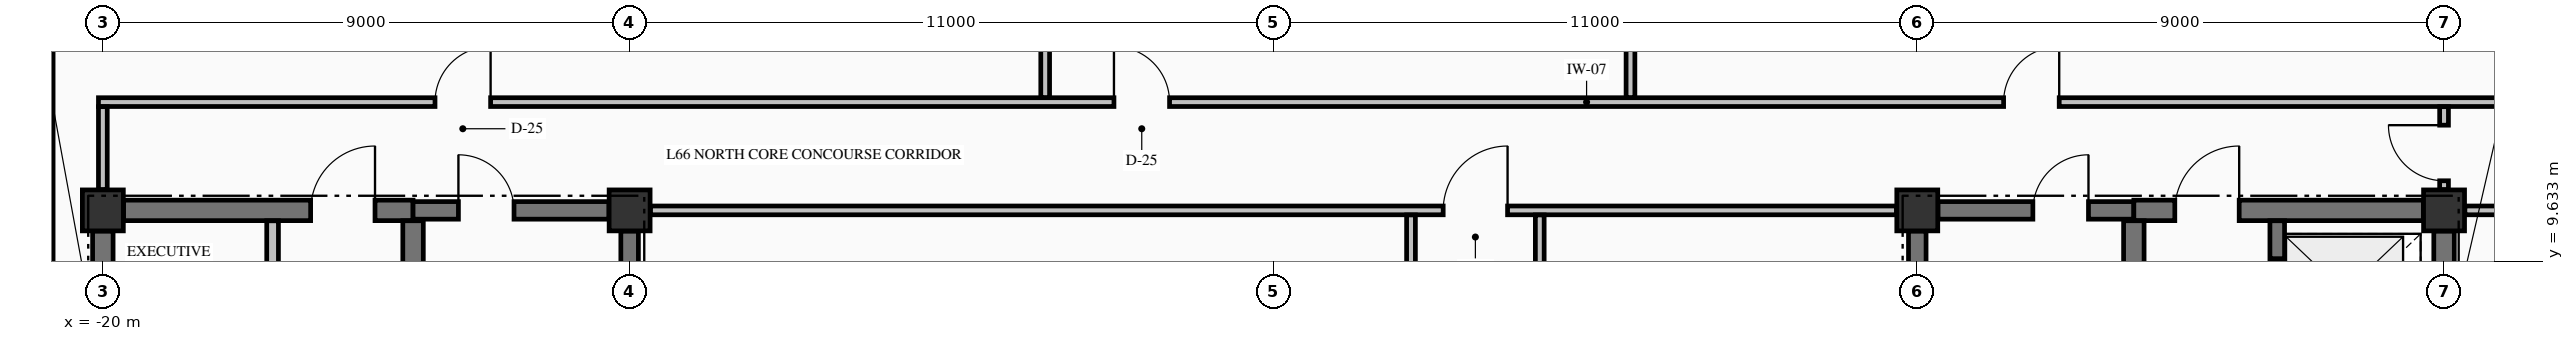
"""IFC4 building model, lengths in metres.
Left out: names, types, materials, properties, quantities, classifications, styles, units other than length and angle.
Written with IfcOpenShell. Run it as: python <this file> out.ifc"""

import sys

from ifc_helpers import new_model, si_unit, direction, frame, frame_2d, origin, origin_2d, place, context, subcontext, project, spatial, rectangle, extrude, element, fill, save


model = new_model("IFC4")
c1 = context("Model", 3, precision=1e-05, world=origin(), true_north=direction((0.0, 1.0)))
c2 = subcontext(c1, "Body", "Model", "MODEL_VIEW")
j1 = project(units=[si_unit("LENGTHUNIT", "METRE"), si_unit("PLANEANGLEUNIT", "RADIAN")], contexts=[c1])
p1 = place(None, origin())
s1 = spatial("IfcSite", under=j1, at=p1, CompositionType="ELEMENT")
p2 = place(p1, origin())
s2 = spatial("IfcBuilding", under=s1, at=p2, CompositionType="ELEMENT")
p3 = place(p2, frame((0.0, 0.0, 249.43)))
s3 = spatial("IfcBuildingStorey", under=s2, at=p3, CompositionType="ELEMENT", Elevation=249.43)
for number, where, z_axis, x_axis in (
    (1, (-20.0, 10.5, -0.425), (0.0, 0.0, 1.0), (1.0, 0.0, 0.0)),
    (2, (-11.0, 10.5, -0.425), (0.0, 0.0, 1.0), (1.0, 0.0, 0.0)),
    (3, (11.0, 10.5, -0.425), (0.0, 0.0, 1.0), (1.0, 0.0, 0.0)),
    (4, (20.0, 10.5, -0.425), (0.0, 0.0, 1.0), (1.0, 0.0, 0.0)),
):
    element("IfcColumn", number, at=place(p3, frame(where, z_axis=z_axis, x_axis=x_axis)), inside=s3, PredefinedType="COLUMN", context=c2, shape_type="SweptSolid", body=[
        extrude(rectangle(XDim=0.7, YDim=0.7, at=origin_2d()), origin(), (0.0, 0.0, 1.0), 5.0),
    ])
p4 = place(p3, frame((-21.0, 17.545, 0.0), z_axis=(0.0, 0.0, 1.0), x_axis=(0.0, -1.0, 0.0)))
e5 = element("IfcWall", 5, at=p4, inside=s3, PredefinedType="STANDARD", context=c2, shape_type="SweptSolid", body=[
    extrude(rectangle(XDim=8.09, YDim=0.3, at=frame_2d((4.045, 0.0))), origin(), (0.0, 0.0, 1.0), 2.167),
])
p5 = place(p3, frame((-19.646, 10.5, 0.0), z_axis=(0.0, 0.0, 1.0), x_axis=(1.0, 0.0, 0.0)))
e6 = element("IfcWall", 6, at=p5, inside=s3, PredefinedType="SHEAR", context=c2, shape_type="SweptSolid", body=[
    extrude(rectangle(XDim=4.946, YDim=0.35, at=frame_2d((2.473, 0.0))), origin(), (0.0, 0.0, 1.0), 4.575),
])
p6 = place(p5, frame((3.196, 0.0, 0.0)))
e7 = element("IfcOpeningElement", 7, at=p6, cuts=e6, PredefinedType="OPENING", context=c2, shape_type="SweptSolid", body=[
    extrude(rectangle(XDim=1.1, YDim=2.15, at=frame_2d((0.55, 1.075))), frame((0.0, 0.185, 0.0), z_axis=(0.0, -1.0, 0.0), x_axis=(1.0, 0.0, 0.0)), (0.0, 0.0, 1.0), 0.37),
])
p7 = place(p3, frame((-14.7, 10.5, 0.0), z_axis=(0.0, 0.0, 1.0), x_axis=(1.0, 0.0, 0.0)))
e8 = element("IfcWall", 8, at=p7, inside=s3, PredefinedType="SHEAR", context=c2, shape_type="SweptSolid", body=[
    extrude(rectangle(XDim=3.346, YDim=0.3, at=frame_2d((1.673, 0.0))), origin(), (0.0, 0.0, 1.0), 4.575),
])
p8 = place(p7, frame((0.775, 0.0, 0.0)))
e9 = element("IfcOpeningElement", 9, at=p8, cuts=e8, PredefinedType="OPENING", context=c2, shape_type="SweptSolid", body=[
    extrude(rectangle(XDim=0.95, YDim=2.15, at=frame_2d((0.475, 1.075))), frame((0.0, 0.16, 0.0), z_axis=(0.0, -1.0, 0.0), x_axis=(1.0, 0.0, 0.0)), (0.0, 0.0, 1.0), 0.32),
])
p9 = place(p3, frame((11.354, 10.5, 0.0), z_axis=(0.0, 0.0, 1.0), x_axis=(1.0, 0.0, 0.0)))
e10 = element("IfcWall", 10, at=p9, inside=s3, PredefinedType="SHEAR", context=c2, shape_type="SweptSolid", body=[
    extrude(rectangle(XDim=3.346, YDim=0.3, at=frame_2d((1.673, 0.0))), origin(), (0.0, 0.0, 1.0), 4.575),
])
p10 = place(p9, frame((1.621, 0.0, 0.0)))
e11 = element("IfcOpeningElement", 11, at=p10, cuts=e10, PredefinedType="OPENING", context=c2, shape_type="SweptSolid", body=[
    extrude(rectangle(XDim=0.95, YDim=2.15, at=frame_2d((0.475, 1.075))), frame((0.0, 0.16, 0.0), z_axis=(0.0, -1.0, 0.0), x_axis=(1.0, 0.0, 0.0)), (0.0, 0.0, 1.0), 0.32),
])
p11 = place(p3, frame((14.7, 10.5, 0.0), z_axis=(0.0, 0.0, 1.0), x_axis=(1.0, 0.0, 0.0)))
e12 = element("IfcWall", 12, at=p11, inside=s3, PredefinedType="SHEAR", context=c2, shape_type="SweptSolid", body=[
    extrude(rectangle(XDim=4.946, YDim=0.35, at=frame_2d((2.473, 0.0))), origin(), (0.0, 0.0, 1.0), 4.575),
])
p12 = place(p11, frame((0.7, 0.0, 0.0)))
e13 = element("IfcOpeningElement", 13, at=p12, cuts=e12, PredefinedType="OPENING", context=c2, shape_type="SweptSolid", body=[
    extrude(rectangle(XDim=1.1, YDim=2.15, at=frame_2d((0.55, 1.075))), frame((0.0, 0.185, 0.0), z_axis=(0.0, -1.0, 0.0), x_axis=(1.0, 0.0, 0.0)), (0.0, 0.0, 1.0), 0.37),
])
p13 = place(p3, frame((-10.644, 10.5, 0.0), z_axis=(0.0, 0.0, 1.0), x_axis=(1.0, 0.0, 0.0)))
e14 = element("IfcWall", 14, at=p13, inside=s3, PredefinedType="PARTITIONING", context=c2, shape_type="SweptSolid", body=[
    extrude(rectangle(XDim=21.288, YDim=0.15, at=frame_2d((10.644, 0.0))), origin(), (0.0, 0.0, 1.0), 4.575),
])
p14 = place(p13, frame((13.544, 0.0, 0.0)))
e15 = element("IfcOpeningElement", 15, at=p14, cuts=e14, PredefinedType="OPENING", context=c2, shape_type="SweptSolid", body=[
    extrude(rectangle(XDim=1.1, YDim=2.15, at=frame_2d((0.55, 1.075))), frame((0.0, 0.085, 0.0), z_axis=(0.0, -1.0, 0.0), x_axis=(1.0, 0.0, 0.0)), (0.0, 0.0, 1.0), 0.17),
])
p15 = place(p3, frame((20.356, 10.5, 0.0), z_axis=(0.0, 0.0, 1.0), x_axis=(1.0, 0.0, 0.0)))
e16 = element("IfcWall", 16, at=p15, inside=s3, PredefinedType="PARTITIONING", context=c2, shape_type="SweptSolid", body=[
    extrude(rectangle(XDim=5.479, YDim=0.15, at=frame_2d((2.74, 0.0))), origin(), (0.0, 0.0, 1.0), 4.575),
])
p16 = place(p15, frame((2.144, 0.0, 0.0)))
e17 = element("IfcOpeningElement", 17, at=p16, cuts=e16, PredefinedType="OPENING", context=c2, shape_type="SweptSolid", body=[
    extrude(rectangle(XDim=1.0, YDim=2.15, at=frame_2d((0.5, 1.075))), frame((0.0, 0.085, 0.0), z_axis=(0.0, -1.0, 0.0), x_axis=(1.0, 0.0, 0.0)), (0.0, 0.0, 1.0), 0.17),
])
p17 = place(p3, frame((-20.075, 12.35, 0.0), z_axis=(0.0, 0.0, 1.0), x_axis=(1.0, 0.0, 0.0)))
e18 = element("IfcWall", 18, at=p17, inside=s3, PredefinedType="PARTITIONING", context=c2, shape_type="SweptSolid", body=[
    extrude(rectangle(XDim=45.91, YDim=0.15, at=frame_2d((22.955, 0.0))), origin(), (0.0, 0.0, 1.0), 2.167),
])
p18 = place(p17, frame((5.75, 0.0, 0.0)))
e19 = element("IfcOpeningElement", 19, at=p18, cuts=e18, PredefinedType="OPENING", context=c2, shape_type="SweptSolid", body=[
    extrude(rectangle(XDim=0.95, YDim=2.02, at=frame_2d((0.475, 1.01))), frame((0.0, 0.085, 0.0), z_axis=(0.0, -1.0, 0.0), x_axis=(1.0, 0.0, 0.0)), (0.0, 0.0, 1.0), 0.17),
])
p19 = place(p17, frame((17.35, 0.0, 0.0)))
e20 = element("IfcOpeningElement", 20, at=p19, cuts=e18, PredefinedType="OPENING", context=c2, shape_type="SweptSolid", body=[
    extrude(rectangle(XDim=0.95, YDim=2.02, at=frame_2d((0.475, 1.01))), frame((0.0, 0.085, 0.0), z_axis=(0.0, -1.0, 0.0), x_axis=(1.0, 0.0, 0.0)), (0.0, 0.0, 1.0), 0.17),
])
p20 = place(p17, frame((32.55, 0.0, 0.0)))
e21 = element("IfcOpeningElement", 21, at=p20, cuts=e18, PredefinedType="OPENING", context=c2, shape_type="SweptSolid", body=[
    extrude(rectangle(XDim=0.95, YDim=2.02, at=frame_2d((0.475, 1.01))), frame((0.0, 0.085, 0.0), z_axis=(0.0, -1.0, 0.0), x_axis=(1.0, 0.0, 0.0)), (0.0, 0.0, 1.0), 0.17),
])
p21 = place(p3, frame((-20.0, 5.327, 0.0), z_axis=(0.0, 0.0, 1.0), x_axis=(0.0, 1.0, 0.0)))
e22 = element("IfcWall", 22, at=p21, inside=s3, PredefinedType="SHEAR", context=c2, shape_type="SweptSolid", body=[
    extrude(rectangle(XDim=4.819, YDim=0.35, at=frame_2d((2.41, 0.0))), origin(), (0.0, 0.0, 1.0), 4.575),
])
p22 = place(p3, frame((-14.7, 5.852, 0.0), z_axis=(0.0, 0.0, 1.0), x_axis=(0.0, 1.0, 0.0)))
e23 = element("IfcWall", 23, at=p22, inside=s3, PredefinedType="SHEAR", context=c2, shape_type="SweptSolid", body=[
    extrude(rectangle(XDim=4.471, YDim=0.35, at=frame_2d((2.235, 0.0))), origin(), (0.0, 0.0, 1.0), 4.575),
])
for number, where, z_axis, x_axis in (
    (24, (-11.0, 5.852, 0.0), (0.0, 0.0, 1.0), (0.0, 1.0, 0.0)),
    (25, (11.0, 5.852, 0.0), (0.0, 0.0, 1.0), (0.0, 1.0, 0.0)),
):
    element("IfcWall", number, at=place(p3, frame(where, z_axis=z_axis, x_axis=x_axis)), inside=s3, PredefinedType="SHEAR", context=c2, shape_type="SweptSolid", body=[
        extrude(rectangle(XDim=4.294, YDim=0.3, at=frame_2d((2.147, 0.0))), origin(), (0.0, 0.0, 1.0), 4.575),
    ])
p23 = place(p3, frame((14.7, 5.852, 0.0), z_axis=(0.0, 0.0, 1.0), x_axis=(0.0, 1.0, 0.0)))
e26 = element("IfcWall", 26, at=p23, inside=s3, PredefinedType="SHEAR", context=c2, shape_type="SweptSolid", body=[
    extrude(rectangle(XDim=4.471, YDim=0.35, at=frame_2d((2.235, 0.0))), origin(), (0.0, 0.0, 1.0), 4.575),
])
p24 = place(p3, frame((17.15, 7.877, 0.0), z_axis=(0.0, 0.0, 1.0), x_axis=(0.0, 1.0, 0.0)))
e27 = element("IfcWall", 27, at=p24, inside=s3, PredefinedType="SOLIDWALL", context=c2, shape_type="SweptSolid", body=[
    extrude(rectangle(XDim=2.446, YDim=0.25, at=frame_2d((1.223, 0.0))), origin(), (0.0, 0.0, 1.0), 4.575),
])
p25 = place(p24, frame((0.698, 0.0, 0.0)))
e28 = element("IfcOpeningElement", 28, at=p25, cuts=e27, PredefinedType="OPENING", context=c2, shape_type="SweptSolid", body=[
    extrude(rectangle(XDim=1.1, YDim=2.2, at=frame_2d((0.55, 1.1))), frame((0.0, 0.135, 0.0), z_axis=(0.0, -1.0, 0.0), x_axis=(1.0, 0.0, 0.0)), (0.0, 0.0, 1.0), 0.27),
])
p26 = place(p3, frame((20.0, 7.877, 0.0), z_axis=(0.0, 0.0, 1.0), x_axis=(0.0, 1.0, 0.0)))
e29 = element("IfcWall", 29, at=p26, inside=s3, PredefinedType="SHEAR", context=c2, shape_type="SweptSolid", body=[
    extrude(rectangle(XDim=2.269, YDim=0.35, at=frame_2d((1.135, 0.0))), origin(), (0.0, 0.0, 1.0), 4.575),
])
p27 = place(p3, frame((-20.0, 10.856, 0.0), z_axis=(0.0, 0.0, 1.0), x_axis=(0.0, 1.0, 0.0)))
e30 = element("IfcWall", 30, at=p27, inside=s3, PredefinedType="PARTITIONING", context=c2, shape_type="SweptSolid", body=[
    extrude(rectangle(XDim=1.416, YDim=0.15, at=frame_2d((0.708, 0.0))), origin(), (0.0, 0.0, 1.0), 4.165),
])
p28 = place(p3, frame((-17.1, 5.328, 0.0), z_axis=(0.0, 0.0, 1.0), x_axis=(0.0, 1.0, 0.0)))
e31 = element("IfcWall", 31, at=p28, inside=s3, PredefinedType="PARTITIONING", context=c2, shape_type="SweptSolid", body=[
    extrude(rectangle(XDim=4.994, YDim=0.2, at=frame_2d((2.497, 0.0))), origin(), (0.0, 0.0, 1.0), 4.575),
])
p29 = place(p28, frame((2.072, 0.0, 0.0)))
e32 = element("IfcOpeningElement", 32, at=p29, cuts=e31, PredefinedType="OPENING", context=c2, shape_type="SweptSolid", body=[
    extrude(rectangle(XDim=0.9, YDim=2.15, at=frame_2d((0.45, 1.075))), frame((0.0, 0.11, 0.0), z_axis=(0.0, -1.0, 0.0), x_axis=(1.0, 0.0, 0.0)), (0.0, 0.0, 1.0), 0.22),
])
p30 = place(p3, frame((-3.9, 12.428, 0.0), z_axis=(0.0, 0.0, 1.0), x_axis=(0.0, 1.0, 0.0)))
e33 = element("IfcWall", 33, at=p30, inside=s3, PredefinedType="PARTITIONING", context=c2, shape_type="SweptSolid", body=[
    extrude(rectangle(XDim=10.907, YDim=0.15, at=frame_2d((5.454, 0.0))), origin(), (0.0, 0.0, 1.0), 4.575),
])
for number, where, z_axis, x_axis in (
    (34, (2.35, 2.978, 0.0), (0.0, 0.0, 1.0), (0.0, 1.0, 0.0)),
    (35, (4.55, 2.978, 0.0), (0.0, 0.0, 1.0), (0.0, 1.0, 0.0)),
):
    element("IfcWall", number, at=place(p3, frame(where, z_axis=z_axis, x_axis=x_axis)), inside=s3, PredefinedType="PARTITIONING", context=c2, shape_type="SweptSolid", body=[
        extrude(rectangle(XDim=7.444, YDim=0.15, at=frame_2d((3.722, 0.0))), origin(), (0.0, 0.0, 1.0), 4.575),
    ])
p31 = place(p3, frame((6.1, 12.428, 0.0), z_axis=(0.0, 0.0, 1.0), x_axis=(0.0, 1.0, 0.0)))
e36 = element("IfcWall", 36, at=p31, inside=s3, PredefinedType="PARTITIONING", context=c2, shape_type="SweptSolid", body=[
    extrude(rectangle(XDim=10.907, YDim=0.15, at=frame_2d((5.454, 0.0))), origin(), (0.0, 0.0, 1.0), 4.575),
])
p32 = place(p3, frame((20.0, 10.856, 0.0), z_axis=(0.0, 0.0, 1.0), x_axis=(0.0, 1.0, 0.0)))
e37 = element("IfcWall", 37, at=p32, inside=s3, PredefinedType="PARTITIONING", context=c2, shape_type="SweptSolid", body=[
    extrude(rectangle(XDim=1.416, YDim=0.15, at=frame_2d((0.708, 0.0))), origin(), (0.0, 0.0, 1.0), 4.575),
])
p33 = place(p32, frame((0.15, 0.0, 0.0)))
e38 = element("IfcOpeningElement", 38, at=p33, cuts=e37, PredefinedType="OPENING", context=c2, shape_type="SweptSolid", body=[
    extrude(rectangle(XDim=0.95, YDim=2.02, at=frame_2d((0.475, 1.01))), frame((0.0, 0.085, 0.0), z_axis=(0.0, -1.0, 0.0), x_axis=(1.0, 0.0, 0.0)), (0.0, 0.0, 1.0), 0.17),
])
p34 = place(p8, origin())
e39 = element("IfcDoor", 39, at=p34, inside=s3, OperationType="SINGLE_SWING_LEFT", PredefinedType="DOOR", context=c2, shape_type="SweptSolid", body=[
    extrude(rectangle(XDim=0.95, YDim=2.15, at=frame_2d((0.475, 1.075))), frame((0.0, 0.025, 0.0), z_axis=(0.0, -1.0, 0.0), x_axis=(1.0, 0.0, 0.0)), (0.0, 0.0, 1.0), 0.05),
])
fill(e9, e39)
p35 = place(p10, origin())
e40 = element("IfcDoor", 40, at=p35, inside=s3, OperationType="SINGLE_SWING_RIGHT", PredefinedType="DOOR", context=c2, shape_type="SweptSolid", body=[
    extrude(rectangle(XDim=0.95, YDim=2.15, at=frame_2d((0.475, 1.075))), frame((0.0, 0.025, 0.0), z_axis=(0.0, -1.0, 0.0), x_axis=(1.0, 0.0, 0.0)), (0.0, 0.0, 1.0), 0.05),
])
fill(e11, e40)
p36 = place(p6, origin())
e41 = element("IfcDoor", 41, at=p36, inside=s3, OperationType="SINGLE_SWING_RIGHT", PredefinedType="DOOR", context=c2, shape_type="SweptSolid", body=[
    extrude(rectangle(XDim=1.1, YDim=2.15, at=frame_2d((0.55, 1.075))), frame((0.0, 0.025, 0.0), z_axis=(0.0, -1.0, 0.0), x_axis=(1.0, 0.0, 0.0)), (0.0, 0.0, 1.0), 0.05),
])
fill(e7, e41)
p37 = place(p25, origin())
e42 = element("IfcDoor", 42, at=p37, inside=s3, OperationType="SLIDING_TO_RIGHT", PredefinedType="DOOR", context=c2, shape_type="SweptSolid", body=[
    extrude(rectangle(XDim=1.1, YDim=2.2, at=frame_2d((0.55, 1.1))), frame((0.0, 0.025, 0.0), z_axis=(0.0, -1.0, 0.0), x_axis=(1.0, 0.0, 0.0)), (0.0, 0.0, 1.0), 0.05),
])
fill(e28, e42)
p38 = place(p12, origin())
e43 = element("IfcDoor", 43, at=p38, inside=s3, OperationType="SINGLE_SWING_RIGHT", PredefinedType="DOOR", context=c2, shape_type="SweptSolid", body=[
    extrude(rectangle(XDim=1.1, YDim=2.15, at=frame_2d((0.55, 1.075))), frame((0.0, 0.025, 0.0), z_axis=(0.0, -1.0, 0.0), x_axis=(1.0, 0.0, 0.0)), (0.0, 0.0, 1.0), 0.05),
])
fill(e13, e43)
p39 = place(p14, origin())
e44 = element("IfcDoor", 44, at=p39, inside=s3, OperationType="SINGLE_SWING_RIGHT", PredefinedType="DOOR", context=c2, shape_type="SweptSolid", body=[
    extrude(rectangle(XDim=1.1, YDim=2.15, at=frame_2d((0.55, 1.075))), frame((0.0, 0.025, 0.0), z_axis=(0.0, -1.0, 0.0), x_axis=(1.0, 0.0, 0.0)), (0.0, 0.0, 1.0), 0.05),
])
fill(e15, e44)
p40 = place(p18, origin())
e45 = element("IfcDoor", 45, at=p40, inside=s3, OperationType="SINGLE_SWING_RIGHT", PredefinedType="DOOR", context=c2, shape_type="SweptSolid", body=[
    extrude(rectangle(XDim=0.95, YDim=2.02, at=frame_2d((0.475, 1.01))), frame((0.0, 0.025, 0.0), z_axis=(0.0, -1.0, 0.0), x_axis=(1.0, 0.0, 0.0)), (0.0, 0.0, 1.0), 0.05),
])
fill(e19, e45)
p41 = place(p19, origin())
e46 = element("IfcDoor", 46, at=p41, inside=s3, OperationType="SINGLE_SWING_LEFT", PredefinedType="DOOR", context=c2, shape_type="SweptSolid", body=[
    extrude(rectangle(XDim=0.95, YDim=2.02, at=frame_2d((0.475, 1.01))), frame((0.0, 0.025, 0.0), z_axis=(0.0, -1.0, 0.0), x_axis=(1.0, 0.0, 0.0)), (0.0, 0.0, 1.0), 0.05),
])
fill(e20, e46)
p42 = place(p20, origin())
e47 = element("IfcDoor", 47, at=p42, inside=s3, OperationType="SINGLE_SWING_RIGHT", PredefinedType="DOOR", context=c2, shape_type="SweptSolid", body=[
    extrude(rectangle(XDim=0.95, YDim=2.02, at=frame_2d((0.475, 1.01))), frame((0.0, 0.025, 0.0), z_axis=(0.0, -1.0, 0.0), x_axis=(1.0, 0.0, 0.0)), (0.0, 0.0, 1.0), 0.05),
])
fill(e21, e47)
p43 = place(p33, origin())
e48 = element("IfcDoor", 48, at=p43, inside=s3, OperationType="SINGLE_SWING_RIGHT", PredefinedType="DOOR", context=c2, shape_type="SweptSolid", body=[
    extrude(rectangle(XDim=0.95, YDim=2.02, at=frame_2d((0.475, 1.01))), frame((0.0, 0.025, 0.0), z_axis=(0.0, -1.0, 0.0), x_axis=(1.0, 0.0, 0.0)), (0.0, 0.0, 1.0), 0.05),
])
fill(e38, e48)
save(model, sys.argv[1])
